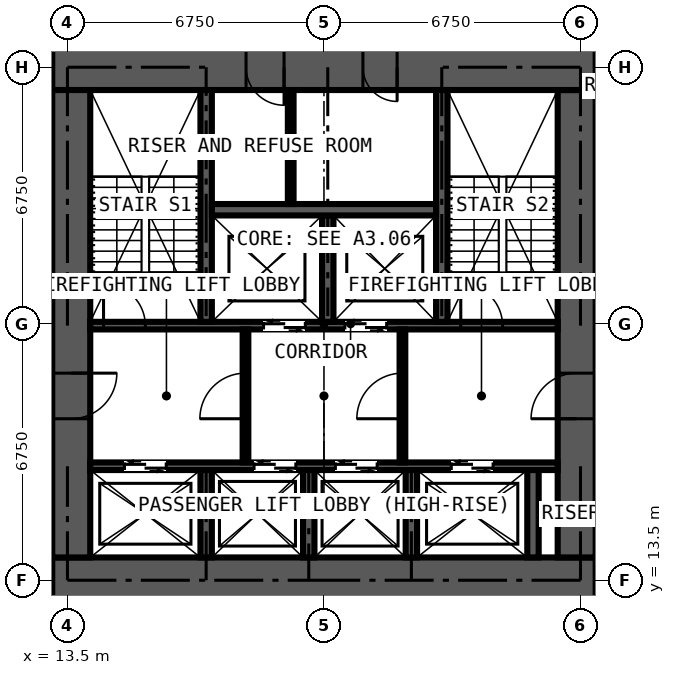
"""IFC4 building model, lengths in metres.
Left out: names, types, materials, properties, quantities, classifications, styles, units other than length and angle.
Written with IfcOpenShell. Run it as: python <this file> out.ifc"""

import sys

from ifc_helpers import new_model, si_unit, direction, frame, frame_2d, origin, place, context, subcontext, project, spatial, rectangle, extrude, element, fill, save


model = new_model("IFC4")
c1 = context("Model", 3, precision=1e-05, world=origin(), true_north=direction((0.0, 1.0)))
c2 = subcontext(c1, "Body", "Model", "MODEL_VIEW")
j1 = project(units=[si_unit("LENGTHUNIT", "METRE"), si_unit("PLANEANGLEUNIT", "RADIAN")], contexts=[c1])
p1 = place(None, origin())
s1 = spatial("IfcSite", under=j1, at=p1, CompositionType="ELEMENT")
p2 = place(p1, origin())
s2 = spatial("IfcBuilding", under=s1, at=p2, CompositionType="ELEMENT")
p3 = place(p2, frame((0.0, 0.0, 156.6)))
s3 = spatial("IfcBuildingStorey", under=s2, at=p3, CompositionType="ELEMENT", Elevation=156.6)
p4 = place(p3, frame((13.1, 13.5, 0.0), z_axis=(0.0, 0.0, 1.0), x_axis=(1.0, 0.0, 0.0)))
e1 = element("IfcWall", 1, at=p4, inside=s3, PredefinedType="SHEAR", context=c2, shape_type="SweptSolid", body=[
    extrude(rectangle(XDim=14.3, YDim=1.2, at=frame_2d((7.15, 0.0))), origin(), (0.0, 0.0, 1.0), 3.6),
])
p5 = place(p3, frame((26.9, 14.1, 0.0), z_axis=(0.0, 0.0, 1.0), x_axis=(0.0, 1.0, 0.0)))
e2 = element("IfcWall", 2, at=p5, inside=s3, PredefinedType="SHEAR", context=c2, shape_type="SweptSolid", body=[
    extrude(rectangle(XDim=12.3, YDim=1.0, at=frame_2d((6.15, 0.0))), origin(), (0.0, 0.0, 1.0), 3.6),
])
p6 = place(p5, frame((3.65, 0.0, 0.0)))
e3 = element("IfcOpeningElement", 3, at=p6, cuts=e2, PredefinedType="OPENING", context=c2, shape_type="SweptSolid", body=[
    extrude(rectangle(XDim=1.2, YDim=2.2, at=frame_2d((0.6, 1.1))), frame((0.0, 0.51, 0.0), z_axis=(0.0, -1.0, 0.0), x_axis=(1.0, 0.0, 0.0)), (0.0, 0.0, 1.0), 1.02),
])
p7 = place(p3, frame((27.4, 27.0, 0.0), z_axis=(0.0, 0.0, 1.0), x_axis=(-1.0, 0.0, 0.0)))
e4 = element("IfcWall", 4, at=p7, inside=s3, PredefinedType="SHEAR", context=c2, shape_type="SweptSolid", body=[
    extrude(rectangle(XDim=14.3, YDim=1.2, at=frame_2d((7.15, 0.0))), origin(), (0.0, 0.0, 1.0), 3.6),
])
p8 = place(p7, frame((5.225, 0.0, 0.0)))
e5 = element("IfcOpeningElement", 5, at=p8, cuts=e4, PredefinedType="OPENING", context=c2, shape_type="SweptSolid", body=[
    extrude(rectangle(XDim=0.9, YDim=2.2, at=frame_2d((0.45, 1.1))), frame((0.0, 0.61, 0.0), z_axis=(0.0, -1.0, 0.0), x_axis=(1.0, 0.0, 0.0)), (0.0, 0.0, 1.0), 1.22),
])
p9 = place(p7, frame((8.2, 0.0, 0.0)))
e6 = element("IfcOpeningElement", 6, at=p9, cuts=e4, PredefinedType="OPENING", context=c2, shape_type="SweptSolid", body=[
    extrude(rectangle(XDim=1.0, YDim=2.2, at=frame_2d((0.5, 1.1))), frame((0.0, 0.61, 0.0), z_axis=(0.0, -1.0, 0.0), x_axis=(1.0, 0.0, 0.0)), (0.0, 0.0, 1.0), 1.22),
])
p10 = place(p3, frame((13.6, 26.4, 0.0), z_axis=(0.0, 0.0, 1.0), x_axis=(0.0, -1.0, 0.0)))
e7 = element("IfcWall", 7, at=p10, inside=s3, PredefinedType="SHEAR", context=c2, shape_type="SweptSolid", body=[
    extrude(rectangle(XDim=12.3, YDim=1.0, at=frame_2d((6.15, 0.0))), origin(), (0.0, 0.0, 1.0), 3.6),
])
p11 = place(p10, frame((7.45, 0.0, 0.0)))
e8 = element("IfcOpeningElement", 8, at=p11, cuts=e7, PredefinedType="OPENING", context=c2, shape_type="SweptSolid", body=[
    extrude(rectangle(XDim=1.2, YDim=2.2, at=frame_2d((0.6, 1.1))), frame((0.0, 0.51, 0.0), z_axis=(0.0, -1.0, 0.0), x_axis=(1.0, 0.0, 0.0)), (0.0, 0.0, 1.0), 1.02),
])
p12 = place(p3, frame((14.1, 16.5, 0.0), z_axis=(0.0, 0.0, 1.0), x_axis=(1.0, 0.0, 0.0)))
e9 = element("IfcWall", 9, at=p12, inside=s3, PredefinedType="SHEAR", context=c2, shape_type="SweptSolid", body=[
    extrude(rectangle(XDim=12.3, YDim=0.2, at=frame_2d((6.15, 0.0))), origin(), (0.0, 0.0, 1.0), 3.6),
])
p13 = place(p12, frame((0.9, 0.0, 0.0)))
e10 = element("IfcOpeningElement", 10, at=p13, cuts=e9, PredefinedType="OPENING", context=c2, shape_type="SweptSolid", body=[
    extrude(rectangle(XDim=1.1, YDim=2.2, at=frame_2d((0.55, 1.1))), frame((0.0, 0.11, 0.0), z_axis=(0.0, -1.0, 0.0), x_axis=(1.0, 0.0, 0.0)), (0.0, 0.0, 1.0), 0.22),
])
p14 = place(p12, frame((4.31, 0.0, 0.0)))
e11 = element("IfcOpeningElement", 11, at=p14, cuts=e9, PredefinedType="OPENING", context=c2, shape_type="SweptSolid", body=[
    extrude(rectangle(XDim=1.1, YDim=2.2, at=frame_2d((0.55, 1.1))), frame((0.0, 0.11, 0.0), z_axis=(0.0, -1.0, 0.0), x_axis=(1.0, 0.0, 0.0)), (0.0, 0.0, 1.0), 0.22),
])
p15 = place(p12, frame((6.45, 0.0, 0.0)))
e12 = element("IfcOpeningElement", 12, at=p15, cuts=e9, PredefinedType="OPENING", context=c2, shape_type="SweptSolid", body=[
    extrude(rectangle(XDim=1.1, YDim=2.2, at=frame_2d((0.55, 1.1))), frame((0.0, 0.11, 0.0), z_axis=(0.0, -1.0, 0.0), x_axis=(1.0, 0.0, 0.0)), (0.0, 0.0, 1.0), 0.22),
])
p16 = place(p12, frame((9.5, 0.0, 0.0)))
e13 = element("IfcOpeningElement", 13, at=p16, cuts=e9, PredefinedType="OPENING", context=c2, shape_type="SweptSolid", body=[
    extrude(rectangle(XDim=1.1, YDim=2.2, at=frame_2d((0.55, 1.1))), frame((0.0, 0.11, 0.0), z_axis=(0.0, -1.0, 0.0), x_axis=(1.0, 0.0, 0.0)), (0.0, 0.0, 1.0), 0.22),
])
p17 = place(p3, frame((14.1, 20.2, 0.0), z_axis=(0.0, 0.0, 1.0), x_axis=(1.0, 0.0, 0.0)))
e14 = element("IfcWall", 14, at=p17, inside=s3, PredefinedType="SHEAR", context=c2, shape_type="SweptSolid", body=[
    extrude(rectangle(XDim=12.3, YDim=0.2, at=frame_2d((6.15, 0.0))), origin(), (0.0, 0.0, 1.0), 3.6),
])
p18 = place(p17, frame((4.56, 0.0, 0.0)))
e15 = element("IfcOpeningElement", 15, at=p18, cuts=e14, PredefinedType="OPENING", context=c2, shape_type="SweptSolid", body=[
    extrude(rectangle(XDim=1.1, YDim=2.2, at=frame_2d((0.55, 1.1))), frame((0.0, 0.11, 0.0), z_axis=(0.0, -1.0, 0.0), x_axis=(1.0, 0.0, 0.0)), (0.0, 0.0, 1.0), 0.22),
])
p19 = place(p17, frame((6.7, 0.0, 0.0)))
e16 = element("IfcOpeningElement", 16, at=p19, cuts=e14, PredefinedType="OPENING", context=c2, shape_type="SweptSolid", body=[
    extrude(rectangle(XDim=1.1, YDim=2.2, at=frame_2d((0.55, 1.1))), frame((0.0, 0.11, 0.0), z_axis=(0.0, -1.0, 0.0), x_axis=(1.0, 0.0, 0.0)), (0.0, 0.0, 1.0), 0.22),
])
p20 = place(p17, frame((0.35, 0.0, 0.0)))
e17 = element("IfcOpeningElement", 17, at=p20, cuts=e14, PredefinedType="OPENING", context=c2, shape_type="SweptSolid", body=[
    extrude(rectangle(XDim=1.1, YDim=2.2, at=frame_2d((0.55, 1.1))), frame((0.0, 0.11, 0.0), z_axis=(0.0, -1.0, 0.0), x_axis=(1.0, 0.0, 0.0)), (0.0, 0.0, 1.0), 0.22),
])
p21 = place(p17, frame((9.75, 0.0, 0.0)))
e18 = element("IfcOpeningElement", 18, at=p21, cuts=e14, PredefinedType="OPENING", context=c2, shape_type="SweptSolid", body=[
    extrude(rectangle(XDim=1.1, YDim=2.2, at=frame_2d((0.55, 1.1))), frame((0.0, 0.11, 0.0), z_axis=(0.0, -1.0, 0.0), x_axis=(1.0, 0.0, 0.0)), (0.0, 0.0, 1.0), 0.22),
])
for number, where, z_axis, x_axis in (
    (19, (17.15, 20.3, 0.0), (0.0, 0.0, 1.0), (0.0, 1.0, 0.0)),
    (20, (23.35, 20.3, 0.0), (0.0, 0.0, 1.0), (0.0, 1.0, 0.0)),
):
    element("IfcWall", number, at=place(p3, frame(where, z_axis=z_axis, x_axis=x_axis)), inside=s3, PredefinedType="SHEAR", context=c2, shape_type="SweptSolid", body=[
        extrude(rectangle(XDim=6.1, YDim=0.3, at=frame_2d((3.05, 0.0))), origin(), (0.0, 0.0, 1.0), 3.6),
    ])
p22 = place(p3, frame((20.35, 20.3, 0.0), z_axis=(0.0, 0.0, 1.0), x_axis=(0.0, 1.0, 0.0)))
e21 = element("IfcWall", 21, at=p22, inside=s3, PredefinedType="SHEAR", context=c2, shape_type="SweptSolid", body=[
    extrude(rectangle(XDim=2.8, YDim=0.3, at=frame_2d((1.4, 0.0))), origin(), (0.0, 0.0, 1.0), 3.6),
])
p23 = place(p3, frame((17.3, 23.25, 0.0), z_axis=(0.0, 0.0, 1.0), x_axis=(1.0, 0.0, 0.0)))
e22 = element("IfcWall", 22, at=p23, inside=s3, PredefinedType="SHEAR", context=c2, shape_type="SweptSolid", body=[
    extrude(rectangle(XDim=5.9, YDim=0.3, at=frame_2d((2.95, 0.0))), origin(), (0.0, 0.0, 1.0), 3.6),
])
for number, where, z_axis, x_axis in (
    (23, (17.15, 14.1, 0.0), (0.0, 0.0, 1.0), (0.0, 1.0, 0.0)),
    (24, (19.85, 14.1, 0.0), (0.0, 0.0, 1.0), (0.0, 1.0, 0.0)),
    (25, (22.55, 14.1, 0.0), (0.0, 0.0, 1.0), (0.0, 1.0, 0.0)),
    (26, (25.75, 14.1, 0.0), (0.0, 0.0, 1.0), (0.0, 1.0, 0.0)),
):
    element("IfcWall", number, at=place(p3, frame(where, z_axis=z_axis, x_axis=x_axis)), inside=s3, PredefinedType="SHEAR", context=c2, shape_type="SweptSolid", body=[
        extrude(rectangle(XDim=2.3, YDim=0.3, at=frame_2d((1.15, 0.0))), origin(), (0.0, 0.0, 1.0), 3.6),
    ])
p24 = place(p3, frame((18.185, 16.6, 0.0), z_axis=(0.0, 0.0, 1.0), x_axis=(0.0, 1.0, 0.0)))
e27 = element("IfcWall", 27, at=p24, inside=s3, PredefinedType="PARTITIONING", context=c2, shape_type="SweptSolid", body=[
    extrude(rectangle(XDim=3.5, YDim=0.15, at=frame_2d((1.75, 0.0))), origin(), (0.0, 0.0, 1.0), 3.375),
])
p25 = place(p24, frame((1.15, 0.0, 0.0)))
e28 = element("IfcOpeningElement", 28, at=p25, cuts=e27, PredefinedType="OPENING", context=c2, shape_type="SweptSolid", body=[
    extrude(rectangle(XDim=1.2, YDim=2.2, at=frame_2d((0.6, 1.1))), frame((0.0, 0.085, 0.0), z_axis=(0.0, -1.0, 0.0), x_axis=(1.0, 0.0, 0.0)), (0.0, 0.0, 1.0), 0.17),
])
p26 = place(p3, frame((22.315, 16.6, 0.0), z_axis=(0.0, 0.0, 1.0), x_axis=(0.0, 1.0, 0.0)))
e29 = element("IfcWall", 29, at=p26, inside=s3, PredefinedType="PARTITIONING", context=c2, shape_type="SweptSolid", body=[
    extrude(rectangle(XDim=3.5, YDim=0.15, at=frame_2d((1.75, 0.0))), origin(), (0.0, 0.0, 1.0), 3.375),
])
p27 = place(p26, frame((1.15, 0.0, 0.0)))
e30 = element("IfcOpeningElement", 30, at=p27, cuts=e29, PredefinedType="OPENING", context=c2, shape_type="SweptSolid", body=[
    extrude(rectangle(XDim=1.2, YDim=2.2, at=frame_2d((0.6, 1.1))), frame((0.0, 0.085, 0.0), z_axis=(0.0, -1.0, 0.0), x_axis=(1.0, 0.0, 0.0)), (0.0, 0.0, 1.0), 0.17),
])
p28 = place(p3, frame((19.375, 23.4, 0.0), z_axis=(0.0, 0.0, 1.0), x_axis=(0.0, 1.0, 0.0)))
e31 = element("IfcWall", 31, at=p28, inside=s3, PredefinedType="PARTITIONING", context=c2, shape_type="SweptSolid", body=[
    extrude(rectangle(XDim=3.0, YDim=0.15, at=frame_2d((1.5, 0.0))), origin(), (0.0, 0.0, 1.0), 3.375),
])
p29 = place(p13, origin())
e32 = element("IfcDoor", 32, at=p29, inside=s3, OperationType="DOUBLE_DOOR_SLIDING", PredefinedType="DOOR", context=c2, shape_type="SweptSolid", body=[
    extrude(rectangle(XDim=1.1, YDim=2.2, at=frame_2d((0.55, 1.1))), frame((0.0, 0.025, 0.0), z_axis=(0.0, -1.0, 0.0), x_axis=(1.0, 0.0, 0.0)), (0.0, 0.0, 1.0), 0.05),
])
fill(e10, e32)
p30 = place(p14, origin())
e33 = element("IfcDoor", 33, at=p30, inside=s3, OperationType="DOUBLE_DOOR_SLIDING", PredefinedType="DOOR", context=c2, shape_type="SweptSolid", body=[
    extrude(rectangle(XDim=1.1, YDim=2.2, at=frame_2d((0.55, 1.1))), frame((0.0, 0.025, 0.0), z_axis=(0.0, -1.0, 0.0), x_axis=(1.0, 0.0, 0.0)), (0.0, 0.0, 1.0), 0.05),
])
fill(e11, e33)
p31 = place(p15, origin())
e34 = element("IfcDoor", 34, at=p31, inside=s3, OperationType="DOUBLE_DOOR_SLIDING", PredefinedType="DOOR", context=c2, shape_type="SweptSolid", body=[
    extrude(rectangle(XDim=1.1, YDim=2.2, at=frame_2d((0.55, 1.1))), frame((0.0, 0.025, 0.0), z_axis=(0.0, -1.0, 0.0), x_axis=(1.0, 0.0, 0.0)), (0.0, 0.0, 1.0), 0.05),
])
fill(e12, e34)
p32 = place(p16, origin())
e35 = element("IfcDoor", 35, at=p32, inside=s3, OperationType="DOUBLE_DOOR_SLIDING", PredefinedType="DOOR", context=c2, shape_type="SweptSolid", body=[
    extrude(rectangle(XDim=1.1, YDim=2.2, at=frame_2d((0.55, 1.1))), frame((0.0, 0.025, 0.0), z_axis=(0.0, -1.0, 0.0), x_axis=(1.0, 0.0, 0.0)), (0.0, 0.0, 1.0), 0.05),
])
fill(e13, e35)
p33 = place(p18, origin())
e36 = element("IfcDoor", 36, at=p33, inside=s3, OperationType="DOUBLE_DOOR_SLIDING", PredefinedType="DOOR", context=c2, shape_type="SweptSolid", body=[
    extrude(rectangle(XDim=1.1, YDim=2.2, at=frame_2d((0.55, 1.1))), frame((0.0, 0.025, 0.0), z_axis=(0.0, -1.0, 0.0), x_axis=(1.0, 0.0, 0.0)), (0.0, 0.0, 1.0), 0.05),
])
fill(e15, e36)
p34 = place(p19, origin())
e37 = element("IfcDoor", 37, at=p34, inside=s3, OperationType="DOUBLE_DOOR_SLIDING", PredefinedType="DOOR", context=c2, shape_type="SweptSolid", body=[
    extrude(rectangle(XDim=1.1, YDim=2.2, at=frame_2d((0.55, 1.1))), frame((0.0, 0.025, 0.0), z_axis=(0.0, -1.0, 0.0), x_axis=(1.0, 0.0, 0.0)), (0.0, 0.0, 1.0), 0.05),
])
fill(e16, e37)
p35 = place(p11, origin())
e38 = element("IfcDoor", 38, at=p35, inside=s3, OperationType="DOUBLE_DOOR_SINGLE_SWING", PredefinedType="DOOR", context=c2, shape_type="SweptSolid", body=[
    extrude(rectangle(XDim=1.2, YDim=2.2, at=frame_2d((0.6, 1.1))), frame((0.0, 0.025, 0.0), z_axis=(0.0, -1.0, 0.0), x_axis=(1.0, 0.0, 0.0)), (0.0, 0.0, 1.0), 0.05),
])
fill(e8, e38)
p36 = place(p6, origin())
e39 = element("IfcDoor", 39, at=p36, inside=s3, OperationType="DOUBLE_DOOR_SINGLE_SWING", PredefinedType="DOOR", context=c2, shape_type="SweptSolid", body=[
    extrude(rectangle(XDim=1.2, YDim=2.2, at=frame_2d((0.6, 1.1))), frame((0.0, 0.025, 0.0), z_axis=(0.0, -1.0, 0.0), x_axis=(1.0, 0.0, 0.0)), (0.0, 0.0, 1.0), 0.05),
])
fill(e3, e39)
p37 = place(p25, origin())
e40 = element("IfcDoor", 40, at=p37, inside=s3, OperationType="DOUBLE_DOOR_SINGLE_SWING", PredefinedType="DOOR", context=c2, shape_type="SweptSolid", body=[
    extrude(rectangle(XDim=1.2, YDim=2.2, at=frame_2d((0.6, 1.1))), frame((0.0, 0.025, 0.0), z_axis=(0.0, -1.0, 0.0), x_axis=(1.0, 0.0, 0.0)), (0.0, 0.0, 1.0), 0.05),
])
fill(e28, e40)
p38 = place(p27, origin())
e41 = element("IfcDoor", 41, at=p38, inside=s3, OperationType="DOUBLE_DOOR_SINGLE_SWING", PredefinedType="DOOR", context=c2, shape_type="SweptSolid", body=[
    extrude(rectangle(XDim=1.2, YDim=2.2, at=frame_2d((0.6, 1.1))), frame((0.0, 0.025, 0.0), z_axis=(0.0, -1.0, 0.0), x_axis=(1.0, 0.0, 0.0)), (0.0, 0.0, 1.0), 0.05),
])
fill(e30, e41)
p39 = place(p8, origin())
e42 = element("IfcDoor", 42, at=p39, inside=s3, OperationType="SINGLE_SWING_LEFT", PredefinedType="DOOR", context=c2, shape_type="SweptSolid", body=[
    extrude(rectangle(XDim=0.9, YDim=2.2, at=frame_2d((0.45, 1.1))), frame((0.0, 0.4, 0.0), z_axis=(0.0, -1.0, 0.0), x_axis=(1.0, 0.0, 0.0)), (0.0, 0.0, 1.0), 0.8),
])
fill(e5, e42)
p40 = place(p9, origin())
e43 = element("IfcDoor", 43, at=p40, inside=s3, OperationType="SINGLE_SWING_LEFT", PredefinedType="DOOR", context=c2, shape_type="SweptSolid", body=[
    extrude(rectangle(XDim=1.0, YDim=2.2, at=frame_2d((0.5, 1.1))), frame((0.0, 0.025, 0.0), z_axis=(0.0, -1.0, 0.0), x_axis=(1.0, 0.0, 0.0)), (0.0, 0.0, 1.0), 0.05),
])
fill(e6, e43)
p41 = place(p20, origin())
e44 = element("IfcDoor", 44, at=p41, inside=s3, OperationType="SINGLE_SWING_LEFT", PredefinedType="DOOR", context=c2, shape_type="SweptSolid", body=[
    extrude(rectangle(XDim=1.1, YDim=2.2, at=frame_2d((0.55, 1.1))), frame((0.0, 0.025, 0.0), z_axis=(0.0, -1.0, 0.0), x_axis=(1.0, 0.0, 0.0)), (0.0, 0.0, 1.0), 0.05),
])
fill(e17, e44)
p42 = place(p21, origin())
e45 = element("IfcDoor", 45, at=p42, inside=s3, OperationType="SINGLE_SWING_LEFT", PredefinedType="DOOR", context=c2, shape_type="SweptSolid", body=[
    extrude(rectangle(XDim=1.1, YDim=2.2, at=frame_2d((0.55, 1.1))), frame((0.0, 0.025, 0.0), z_axis=(0.0, -1.0, 0.0), x_axis=(1.0, 0.0, 0.0)), (0.0, 0.0, 1.0), 0.05),
])
fill(e18, e45)
save(model, sys.argv[1])
